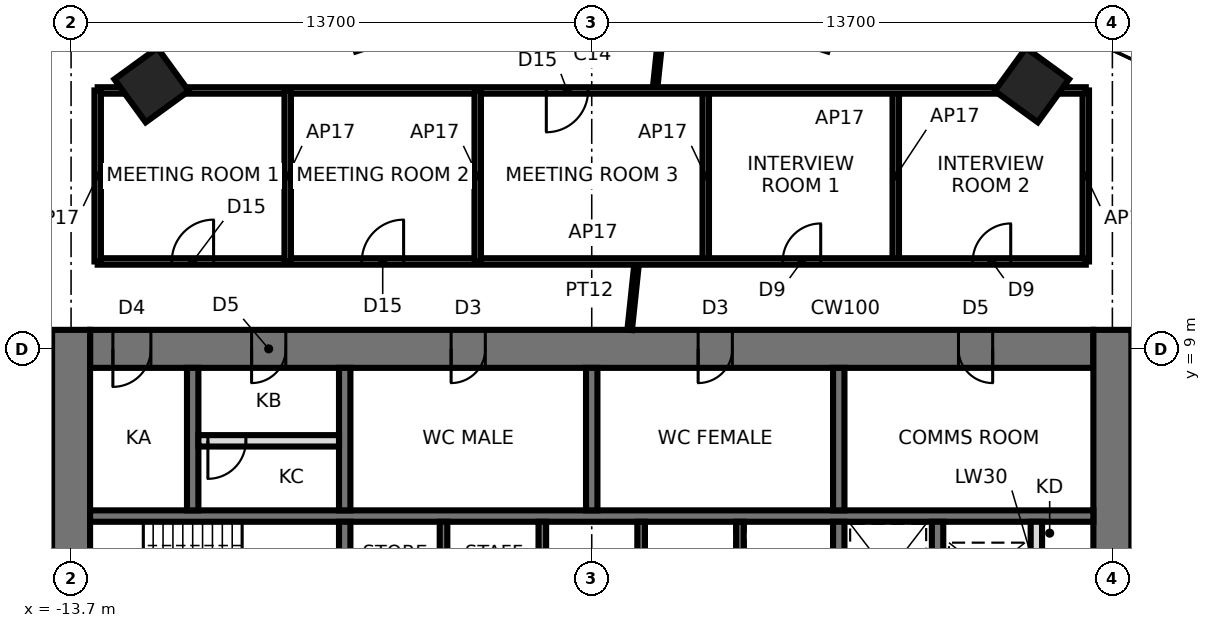
"""IFC4 building model, lengths in metres.
Left out: names, types, materials, properties, quantities, classifications, styles, units other than length and angle.
Written with IfcOpenShell. Run it as: python <this file> out.ifc"""

import sys

from ifc_helpers import new_model, si_unit, direction, frame, frame_2d, origin, origin_2d, place, context, subcontext, project, spatial, rectangle, extrude, element, fill, save


model = new_model("IFC4")
c1 = context("Model", 3, precision=1e-05, world=origin(), true_north=direction((0.0, 1.0)))
c2 = subcontext(c1, "Body", "Model", "MODEL_VIEW")
j1 = project(units=[si_unit("LENGTHUNIT", "METRE"), si_unit("PLANEANGLEUNIT", "RADIAN")], contexts=[c1])
p1 = place(None, origin())
s1 = spatial("IfcSite", under=j1, at=p1, CompositionType="ELEMENT")
p2 = place(p1, origin())
s2 = spatial("IfcBuilding", under=s1, at=p2, CompositionType="ELEMENT")
p3 = place(p2, frame((0.0, 0.0, 234.5)))
s3 = spatial("IfcBuildingStorey", under=s2, at=p3, CompositionType="ELEMENT", Elevation=234.5)
for number, where, z_axis, x_axis in (
    (1, (11.581, 15.94, 0.0), (0.0, 0.0, 1.0), (0.588, 0.809, 0.0)),
    (2, (-11.581, 15.94, 0.0), (0.0, 0.0, 1.0), (-0.588, 0.809, 0.0)),
):
    element("IfcColumn", number, at=place(p3, frame(where, z_axis=z_axis, x_axis=x_axis)), inside=s3, PredefinedType="COLUMN", context=c2, shape_type="SweptSolid", body=[
        extrude(rectangle(XDim=1.4, YDim=1.4, at=origin_2d()), origin(), (0.0, 0.0, 1.0), 3.9),
    ])
p4 = place(p3, frame((13.2, 9.0, 0.0), z_axis=(0.0, 0.0, 1.0), x_axis=(-1.0, 0.0, 0.0)))
e3 = element("IfcWall", 3, at=p4, inside=s3, PredefinedType="SHEAR", context=c2, shape_type="SweptSolid", body=[
    extrude(rectangle(XDim=26.4, YDim=1.0, at=frame_2d((13.2, 0.0))), origin(), (0.0, 0.0, 1.0), 3.9),
])
p5 = place(p4, frame((2.65, 0.0, 0.0)))
e4 = element("IfcOpeningElement", 4, at=p5, cuts=e3, PredefinedType="OPENING", context=c2, shape_type="SweptSolid", body=[
    extrude(rectangle(XDim=0.9, YDim=2.1, at=frame_2d((0.45, 1.05))), frame((0.0, 0.51, 0.0), z_axis=(0.0, -1.0, 0.0), x_axis=(1.0, 0.0, 0.0)), (0.0, 0.0, 1.0), 1.02),
])
p6 = place(p4, frame((9.5, 0.0, 0.0)))
e5 = element("IfcOpeningElement", 5, at=p6, cuts=e3, PredefinedType="OPENING", context=c2, shape_type="SweptSolid", body=[
    extrude(rectangle(XDim=0.9, YDim=2.1, at=frame_2d((0.45, 1.05))), frame((0.0, 0.51, 0.0), z_axis=(0.0, -1.0, 0.0), x_axis=(1.0, 0.0, 0.0)), (0.0, 0.0, 1.0), 1.02),
])
p7 = place(p4, frame((16.0, 0.0, 0.0)))
e6 = element("IfcOpeningElement", 6, at=p7, cuts=e3, PredefinedType="OPENING", context=c2, shape_type="SweptSolid", body=[
    extrude(rectangle(XDim=0.9, YDim=2.1, at=frame_2d((0.45, 1.05))), frame((0.0, 0.51, 0.0), z_axis=(0.0, -1.0, 0.0), x_axis=(1.0, 0.0, 0.0)), (0.0, 0.0, 1.0), 1.02),
])
p8 = place(p4, frame((21.25, 0.0, 0.0)))
e7 = element("IfcOpeningElement", 7, at=p8, cuts=e3, PredefinedType="OPENING", context=c2, shape_type="SweptSolid", body=[
    extrude(rectangle(XDim=0.9, YDim=2.1, at=frame_2d((0.45, 1.05))), frame((0.0, 0.51, 0.0), z_axis=(0.0, -1.0, 0.0), x_axis=(1.0, 0.0, 0.0)), (0.0, 0.0, 1.0), 1.02),
])
p9 = place(p4, frame((24.8, 0.0, 0.0)))
e8 = element("IfcOpeningElement", 8, at=p9, cuts=e3, PredefinedType="OPENING", context=c2, shape_type="SweptSolid", body=[
    extrude(rectangle(XDim=1.0, YDim=2.1, at=frame_2d((0.5, 1.05))), frame((0.0, 0.51, 0.0), z_axis=(0.0, -1.0, 0.0), x_axis=(1.0, 0.0, 0.0)), (0.0, 0.0, 1.0), 1.02),
])
p10 = place(p3, frame((13.7, -9.5, 0.0), z_axis=(0.0, 0.0, 1.0), x_axis=(0.0, 1.0, 0.0)))
e9 = element("IfcWall", 9, at=p10, inside=s3, PredefinedType="SHEAR", context=c2, shape_type="SweptSolid", body=[
    extrude(rectangle(XDim=19.0, YDim=1.0, at=frame_2d((9.5, 0.0))), origin(), (0.0, 0.0, 1.0), 3.9),
])
p11 = place(p10, frame((8.6, 0.0, 0.0)))
e10 = element("IfcOpeningElement", 10, at=p11, cuts=e9, PredefinedType="OPENING", context=c2, shape_type="SweptSolid", body=[
    extrude(rectangle(XDim=1.8, YDim=2.4, at=frame_2d((0.9, 1.2))), frame((0.0, 0.51, 0.0), z_axis=(0.0, -1.0, 0.0), x_axis=(1.0, 0.0, 0.0)), (0.0, 0.0, 1.0), 1.02),
])
p12 = place(p3, frame((-13.7, 9.5, 0.0), z_axis=(0.0, 0.0, 1.0), x_axis=(0.0, -1.0, 0.0)))
e11 = element("IfcWall", 11, at=p12, inside=s3, PredefinedType="SHEAR", context=c2, shape_type="SweptSolid", body=[
    extrude(rectangle(XDim=19.0, YDim=1.0, at=frame_2d((9.5, 0.0))), origin(), (0.0, 0.0, 1.0), 3.9),
])
p13 = place(p12, frame((8.6, 0.0, 0.0)))
e12 = element("IfcOpeningElement", 12, at=p13, cuts=e11, PredefinedType="OPENING", context=c2, shape_type="SweptSolid", body=[
    extrude(rectangle(XDim=1.8, YDim=2.4, at=frame_2d((0.9, 1.2))), frame((0.0, 0.51, 0.0), z_axis=(0.0, -1.0, 0.0), x_axis=(1.0, 0.0, 0.0)), (0.0, 0.0, 1.0), 1.02),
])
p14 = place(p3, frame((-13.2, 4.6, 0.0), z_axis=(0.0, 0.0, 1.0), x_axis=(1.0, 0.0, 0.0)))
e13 = element("IfcWall", 13, at=p14, inside=s3, PredefinedType="SHEAR", context=c2, shape_type="SweptSolid", body=[
    extrude(rectangle(XDim=26.4, YDim=0.3, at=frame_2d((13.2, 0.0))), origin(), (0.0, 0.0, 1.0), 3.9),
])
p15 = place(p3, frame((-6.5, 1.75, 0.0), z_axis=(0.0, 0.0, 1.0), x_axis=(0.0, 1.0, 0.0)))
e14 = element("IfcWall", 14, at=p15, inside=s3, PredefinedType="SHEAR", context=c2, shape_type="SweptSolid", body=[
    extrude(rectangle(XDim=2.7, YDim=0.3, at=frame_2d((1.35, 0.0))), origin(), (0.0, 0.0, 1.0), 3.9),
])
p16 = place(p3, frame((-6.5, 4.75, 0.0), z_axis=(0.0, 0.0, 1.0), x_axis=(0.0, 1.0, 0.0)))
e15 = element("IfcWall", 15, at=p16, inside=s3, PredefinedType="SHEAR", context=c2, shape_type="SweptSolid", body=[
    extrude(rectangle(XDim=3.75, YDim=0.3, at=frame_2d((1.875, 0.0))), origin(), (0.0, 0.0, 1.0), 3.9),
])
p17 = place(p3, frame((6.5, 1.75, 0.0), z_axis=(0.0, 0.0, 1.0), x_axis=(0.0, 1.0, 0.0)))
e16 = element("IfcWall", 16, at=p17, inside=s3, PredefinedType="SHEAR", context=c2, shape_type="SweptSolid", body=[
    extrude(rectangle(XDim=2.7, YDim=0.3, at=frame_2d((1.35, 0.0))), origin(), (0.0, 0.0, 1.0), 3.9),
])
p18 = place(p3, frame((6.5, 4.75, 0.0), z_axis=(0.0, 0.0, 1.0), x_axis=(0.0, 1.0, 0.0)))
e17 = element("IfcWall", 17, at=p18, inside=s3, PredefinedType="SHEAR", context=c2, shape_type="SweptSolid", body=[
    extrude(rectangle(XDim=3.75, YDim=0.3, at=frame_2d((1.875, 0.0))), origin(), (0.0, 0.0, 1.0), 3.9),
])
for number, where, z_axis, x_axis in (
    (18, (-3.9, 1.75, 0.0), (0.0, 0.0, 1.0), (0.0, 1.0, 0.0)),
    (19, (-1.3, 1.75, 0.0), (0.0, 0.0, 1.0), (0.0, 1.0, 0.0)),
    (20, (1.3, 1.75, 0.0), (0.0, 0.0, 1.0), (0.0, 1.0, 0.0)),
    (21, (3.9, 1.75, 0.0), (0.0, 0.0, 1.0), (0.0, 1.0, 0.0)),
):
    element("IfcWall", number, at=place(p3, frame(where, z_axis=z_axis, x_axis=x_axis)), inside=s3, PredefinedType="SHEAR", context=c2, shape_type="SweptSolid", body=[
        extrude(rectangle(XDim=2.7, YDim=0.2, at=frame_2d((1.35, 0.0))), origin(), (0.0, 0.0, 1.0), 3.9),
    ])
for number, where, z_axis, x_axis in (
    (22, (0.0, 4.75, 0.0), (0.0, 0.0, 1.0), (0.0, 1.0, 0.0)),
    (23, (-10.5, 4.75, 0.0), (0.0, 0.0, 1.0), (0.0, 1.0, 0.0)),
):
    element("IfcWall", number, at=place(p3, frame(where, z_axis=z_axis, x_axis=x_axis)), inside=s3, PredefinedType="SHEAR", context=c2, shape_type="SweptSolid", body=[
        extrude(rectangle(XDim=3.75, YDim=0.3, at=frame_2d((1.875, 0.0))), origin(), (0.0, 0.0, 1.0), 3.9),
    ])
p19 = place(p3, frame((9.1, 1.75, 0.0), z_axis=(0.0, 0.0, 1.0), x_axis=(0.0, 1.0, 0.0)))
e24 = element("IfcWall", 24, at=p19, inside=s3, PredefinedType="SHEAR", context=c2, shape_type="SweptSolid", body=[
    extrude(rectangle(XDim=2.7, YDim=0.3, at=frame_2d((1.35, 0.0))), origin(), (0.0, 0.0, 1.0), 3.9),
])
p20 = place(p3, frame((-10.35, 6.58, 0.0), z_axis=(0.0, 0.0, 1.0), x_axis=(1.0, 0.0, 0.0)))
e25 = element("IfcWall", 25, at=p20, inside=s3, PredefinedType="PARTITIONING", context=c2, shape_type="SweptSolid", body=[
    extrude(rectangle(XDim=3.7, YDim=0.3, at=frame_2d((1.85, 0.0))), origin(), (0.0, 0.0, 1.0), 3.74),
])
p21 = place(p20, frame((0.25, 0.0, 0.0)))
e26 = element("IfcOpeningElement", 26, at=p21, cuts=e25, PredefinedType="OPENING", context=c2, shape_type="SweptSolid", body=[
    extrude(rectangle(XDim=1.0, YDim=2.4, at=frame_2d((0.5, 1.2))), frame((0.0, 0.16, 0.0), z_axis=(0.0, -1.0, 0.0), x_axis=(1.0, 0.0, 0.0)), (0.0, 0.0, 1.0), 0.32),
])
p22 = place(p3, frame((11.7, 1.75, 0.0), z_axis=(0.0, 0.0, 1.0), x_axis=(0.0, 1.0, 0.0)))
e27 = element("IfcWall", 27, at=p22, inside=s3, PredefinedType="SOLIDWALL", context=c2, shape_type="SweptSolid", body=[
    extrude(rectangle(XDim=2.7, YDim=0.3, at=frame_2d((1.35, 0.0))), origin(), (0.0, 0.0, 1.0), 3.74),
])
for number, where, z_axis, x_axis in (
    (28, (13.0, 11.3, 0.0), (0.0, 0.0, 1.0), (0.0, 1.0, 0.0)),
    (29, (8.0, 15.8, 0.0), (0.0, 0.0, 1.0), (0.0, -1.0, 0.0)),
    (30, (3.0, 15.8, 0.0), (0.0, 0.0, 1.0), (0.0, -1.0, 0.0)),
):
    element("IfcWall", number, at=place(p3, frame(where, z_axis=z_axis, x_axis=x_axis)), inside=s3, PredefinedType="PARTITIONING", context=c2, shape_type="SweptSolid", body=[
        extrude(rectangle(XDim=4.5, YDim=0.17, at=frame_2d((2.25, 0.0))), origin(), (0.0, 0.0, 1.0), 3.74),
    ])
p23 = place(p3, frame((1.661, 15.8, 0.0), z_axis=(0.0, 0.0, 1.0), x_axis=(0.104548874513, 0.994519749848, 0.0)))
e31 = element("IfcWall", 31, at=p23, inside=s3, PredefinedType="PARTITIONING", context=c2, shape_type="SweptSolid", body=[
    extrude(rectangle(XDim=4.302, YDim=0.12, at=frame_2d((2.151, 0.0))), origin(), (0.0, 0.0, 1.0), 3.74),
])
p24 = place(p3, frame((0.999, 9.5, 0.0), z_axis=(0.0, 0.0, 1.0), x_axis=(0.104537331683, 0.99452096322, 0.0)))
e32 = element("IfcWall", 32, at=p24, inside=s3, PredefinedType="PARTITIONING", context=c2, shape_type="SweptSolid", body=[
    extrude(rectangle(XDim=1.81, YDim=0.12, at=frame_2d((0.905, 0.0))), origin(), (0.0, 0.0, 1.0), 3.74),
])
p25 = place(p3, frame((-13.0, 11.3, 0.0), z_axis=(0.0, 0.0, 1.0), x_axis=(1.0, 0.0, 0.0)))
e33 = element("IfcWall", 33, at=p25, inside=s3, PredefinedType="PARTITIONING", context=c2, shape_type="SweptSolid", body=[
    extrude(rectangle(XDim=26.0, YDim=0.17, at=frame_2d((13.0, 0.0))), origin(), (0.0, 0.0, 1.0), 3.74),
])
p26 = place(p25, frame((1.95, 0.0, 0.0)))
e34 = element("IfcOpeningElement", 34, at=p26, cuts=e33, PredefinedType="OPENING", context=c2, shape_type="SweptSolid", body=[
    extrude(rectangle(XDim=1.1, YDim=2.4, at=frame_2d((0.55, 1.2))), frame((0.0, 0.095, 0.0), z_axis=(0.0, -1.0, 0.0), x_axis=(1.0, 0.0, 0.0)), (0.0, 0.0, 1.0), 0.19),
])
p27 = place(p25, frame((6.95, 0.0, 0.0)))
e35 = element("IfcOpeningElement", 35, at=p27, cuts=e33, PredefinedType="OPENING", context=c2, shape_type="SweptSolid", body=[
    extrude(rectangle(XDim=1.1, YDim=2.4, at=frame_2d((0.55, 1.2))), frame((0.0, 0.095, 0.0), z_axis=(0.0, -1.0, 0.0), x_axis=(1.0, 0.0, 0.0)), (0.0, 0.0, 1.0), 0.19),
])
p28 = place(p25, frame((18.025, 0.0, 0.0)))
e36 = element("IfcOpeningElement", 36, at=p28, cuts=e33, PredefinedType="OPENING", context=c2, shape_type="SweptSolid", body=[
    extrude(rectangle(XDim=1.0, YDim=2.4, at=frame_2d((0.5, 1.2))), frame((0.0, 0.095, 0.0), z_axis=(0.0, -1.0, 0.0), x_axis=(1.0, 0.0, 0.0)), (0.0, 0.0, 1.0), 0.19),
])
p29 = place(p25, frame((23.025, 0.0, 0.0)))
e37 = element("IfcOpeningElement", 37, at=p29, cuts=e33, PredefinedType="OPENING", context=c2, shape_type="SweptSolid", body=[
    extrude(rectangle(XDim=1.0, YDim=2.4, at=frame_2d((0.5, 1.2))), frame((0.0, 0.095, 0.0), z_axis=(0.0, -1.0, 0.0), x_axis=(1.0, 0.0, 0.0)), (0.0, 0.0, 1.0), 0.19),
])
p30 = place(p3, frame((13.0, 15.8, 0.0), z_axis=(0.0, 0.0, 1.0), x_axis=(-1.0, 0.0, 0.0)))
e38 = element("IfcWall", 38, at=p30, inside=s3, PredefinedType="PARTITIONING", context=c2, shape_type="SweptSolid", body=[
    extrude(rectangle(XDim=26.0, YDim=0.17, at=frame_2d((13.0, 0.0))), origin(), (0.0, 0.0, 1.0), 3.74),
])
p31 = place(p30, frame((13.095, 0.0, 0.0)))
e39 = element("IfcOpeningElement", 39, at=p31, cuts=e38, PredefinedType="OPENING", context=c2, shape_type="SweptSolid", body=[
    extrude(rectangle(XDim=1.1, YDim=2.4, at=frame_2d((0.55, 1.2))), frame((0.0, 0.095, 0.0), z_axis=(0.0, -1.0, 0.0), x_axis=(1.0, 0.0, 0.0)), (0.0, 0.0, 1.0), 0.19),
])
for number, where, z_axis, x_axis in (
    (40, (-3.0, 15.8, 0.0), (0.0, 0.0, 1.0), (0.0, -1.0, 0.0)),
    (41, (-8.0, 15.8, 0.0), (0.0, 0.0, 1.0), (0.0, -1.0, 0.0)),
    (42, (-13.0, 15.8, 0.0), (0.0, 0.0, 1.0), (0.0, -1.0, 0.0)),
):
    element("IfcWall", number, at=place(p3, frame(where, z_axis=z_axis, x_axis=x_axis)), inside=s3, PredefinedType="PARTITIONING", context=c2, shape_type="SweptSolid", body=[
        extrude(rectangle(XDim=4.5, YDim=0.17, at=frame_2d((2.25, 0.0))), origin(), (0.0, 0.0, 1.0), 3.74),
    ])
p32 = place(p5, origin())
e43 = element("IfcDoor", 43, at=p32, inside=s3, OperationType="SINGLE_SWING_LEFT", PredefinedType="DOOR", context=c2, shape_type="SweptSolid", body=[
    extrude(rectangle(XDim=0.82, YDim=2.06, at=frame_2d((0.45, 1.03))), frame((0.0, 0.025, 0.0), z_axis=(0.0, -1.0, 0.0), x_axis=(1.0, 0.0, 0.0)), (0.0, 0.0, 1.0), 0.05),
    extrude(rectangle(XDim=0.04, YDim=2.1, at=frame_2d((0.02, 1.05))), frame((0.0, 0.25, 0.0), z_axis=(0.0, -1.0, 0.0), x_axis=(1.0, 0.0, 0.0)), (0.0, 0.0, 1.0), 0.5),
    extrude(rectangle(XDim=0.04, YDim=2.1, at=frame_2d((0.88, 1.05))), frame((0.0, 0.25, 0.0), z_axis=(0.0, -1.0, 0.0), x_axis=(1.0, 0.0, 0.0)), (0.0, 0.0, 1.0), 0.5),
    extrude(rectangle(XDim=0.82, YDim=0.04, at=frame_2d((0.45, 2.08))), frame((0.0, 0.25, 0.0), z_axis=(0.0, -1.0, 0.0), x_axis=(1.0, 0.0, 0.0)), (0.0, 0.0, 1.0), 0.5),
])
fill(e4, e43)
p33 = place(p6, origin())
e44 = element("IfcDoor", 44, at=p33, inside=s3, OperationType="SINGLE_SWING_RIGHT", PredefinedType="DOOR", context=c2, shape_type="SweptSolid", body=[
    extrude(rectangle(XDim=0.82, YDim=2.06, at=frame_2d((0.45, 1.03))), frame((0.0, 0.025, 0.0), z_axis=(0.0, -1.0, 0.0), x_axis=(1.0, 0.0, 0.0)), (0.0, 0.0, 1.0), 0.05),
    extrude(rectangle(XDim=0.04, YDim=2.1, at=frame_2d((0.02, 1.05))), frame((0.0, 0.25, 0.0), z_axis=(0.0, -1.0, 0.0), x_axis=(1.0, 0.0, 0.0)), (0.0, 0.0, 1.0), 0.5),
    extrude(rectangle(XDim=0.04, YDim=2.1, at=frame_2d((0.88, 1.05))), frame((0.0, 0.25, 0.0), z_axis=(0.0, -1.0, 0.0), x_axis=(1.0, 0.0, 0.0)), (0.0, 0.0, 1.0), 0.5),
    extrude(rectangle(XDim=0.82, YDim=0.04, at=frame_2d((0.45, 2.08))), frame((0.0, 0.25, 0.0), z_axis=(0.0, -1.0, 0.0), x_axis=(1.0, 0.0, 0.0)), (0.0, 0.0, 1.0), 0.5),
])
fill(e5, e44)
p34 = place(p7, origin())
e45 = element("IfcDoor", 45, at=p34, inside=s3, OperationType="SINGLE_SWING_RIGHT", PredefinedType="DOOR", context=c2, shape_type="SweptSolid", body=[
    extrude(rectangle(XDim=0.82, YDim=2.06, at=frame_2d((0.45, 1.03))), frame((0.0, 0.025, 0.0), z_axis=(0.0, -1.0, 0.0), x_axis=(1.0, 0.0, 0.0)), (0.0, 0.0, 1.0), 0.05),
    extrude(rectangle(XDim=0.04, YDim=2.1, at=frame_2d((0.02, 1.05))), frame((0.0, 0.25, 0.0), z_axis=(0.0, -1.0, 0.0), x_axis=(1.0, 0.0, 0.0)), (0.0, 0.0, 1.0), 0.5),
    extrude(rectangle(XDim=0.04, YDim=2.1, at=frame_2d((0.88, 1.05))), frame((0.0, 0.25, 0.0), z_axis=(0.0, -1.0, 0.0), x_axis=(1.0, 0.0, 0.0)), (0.0, 0.0, 1.0), 0.5),
    extrude(rectangle(XDim=0.82, YDim=0.04, at=frame_2d((0.45, 2.08))), frame((0.0, 0.25, 0.0), z_axis=(0.0, -1.0, 0.0), x_axis=(1.0, 0.0, 0.0)), (0.0, 0.0, 1.0), 0.5),
])
fill(e6, e45)
p35 = place(p8, origin())
e46 = element("IfcDoor", 46, at=p35, inside=s3, OperationType="SINGLE_SWING_RIGHT", PredefinedType="DOOR", context=c2, shape_type="SweptSolid", body=[
    extrude(rectangle(XDim=0.82, YDim=2.06, at=frame_2d((0.45, 1.03))), frame((0.0, 0.025, 0.0), z_axis=(0.0, -1.0, 0.0), x_axis=(1.0, 0.0, 0.0)), (0.0, 0.0, 1.0), 0.05),
    extrude(rectangle(XDim=0.04, YDim=2.1, at=frame_2d((0.02, 1.05))), frame((0.0, 0.25, 0.0), z_axis=(0.0, -1.0, 0.0), x_axis=(1.0, 0.0, 0.0)), (0.0, 0.0, 1.0), 0.5),
    extrude(rectangle(XDim=0.04, YDim=2.1, at=frame_2d((0.88, 1.05))), frame((0.0, 0.25, 0.0), z_axis=(0.0, -1.0, 0.0), x_axis=(1.0, 0.0, 0.0)), (0.0, 0.0, 1.0), 0.5),
    extrude(rectangle(XDim=0.82, YDim=0.04, at=frame_2d((0.45, 2.08))), frame((0.0, 0.25, 0.0), z_axis=(0.0, -1.0, 0.0), x_axis=(1.0, 0.0, 0.0)), (0.0, 0.0, 1.0), 0.5),
])
fill(e7, e46)
p36 = place(p9, origin())
e47 = element("IfcDoor", 47, at=p36, inside=s3, OperationType="SINGLE_SWING_RIGHT", PredefinedType="DOOR", context=c2, shape_type="SweptSolid", body=[
    extrude(rectangle(XDim=0.92, YDim=2.06, at=frame_2d((0.5, 1.03))), frame((0.0, 0.025, 0.0), z_axis=(0.0, -1.0, 0.0), x_axis=(1.0, 0.0, 0.0)), (0.0, 0.0, 1.0), 0.05),
    extrude(rectangle(XDim=0.04, YDim=2.1, at=frame_2d((0.02, 1.05))), frame((0.0, 0.25, 0.0), z_axis=(0.0, -1.0, 0.0), x_axis=(1.0, 0.0, 0.0)), (0.0, 0.0, 1.0), 0.5),
    extrude(rectangle(XDim=0.04, YDim=2.1, at=frame_2d((0.98, 1.05))), frame((0.0, 0.25, 0.0), z_axis=(0.0, -1.0, 0.0), x_axis=(1.0, 0.0, 0.0)), (0.0, 0.0, 1.0), 0.5),
    extrude(rectangle(XDim=0.92, YDim=0.04, at=frame_2d((0.5, 2.08))), frame((0.0, 0.25, 0.0), z_axis=(0.0, -1.0, 0.0), x_axis=(1.0, 0.0, 0.0)), (0.0, 0.0, 1.0), 0.5),
])
fill(e8, e47)
p37 = place(p21, frame((1.0, 0.0, 0.0), z_axis=(0.0, 0.0, 1.0), x_axis=(-1.0, 0.0, 0.0)))
e48 = element("IfcDoor", 48, at=p37, inside=s3, OperationType="SINGLE_SWING_RIGHT", PredefinedType="DOOR", context=c2, shape_type="SweptSolid", body=[
    extrude(rectangle(XDim=1.0, YDim=2.4, at=frame_2d((0.5, 1.2))), frame((0.0, 0.025, 0.0), z_axis=(0.0, -1.0, 0.0), x_axis=(1.0, 0.0, 0.0)), (0.0, 0.0, 1.0), 0.05),
])
fill(e26, e48)
p38 = place(p26, origin())
e49 = element("IfcDoor", 49, at=p38, inside=s3, OperationType="SINGLE_SWING_RIGHT", PredefinedType="DOOR", context=c2, shape_type="SweptSolid", body=[
    extrude(rectangle(XDim=1.1, YDim=2.4, at=frame_2d((0.55, 1.2))), frame((0.0, 0.025, 0.0), z_axis=(0.0, -1.0, 0.0), x_axis=(1.0, 0.0, 0.0)), (0.0, 0.0, 1.0), 0.05),
])
fill(e34, e49)
p39 = place(p27, origin())
e50 = element("IfcDoor", 50, at=p39, inside=s3, OperationType="SINGLE_SWING_RIGHT", PredefinedType="DOOR", context=c2, shape_type="SweptSolid", body=[
    extrude(rectangle(XDim=1.1, YDim=2.4, at=frame_2d((0.55, 1.2))), frame((0.0, 0.025, 0.0), z_axis=(0.0, -1.0, 0.0), x_axis=(1.0, 0.0, 0.0)), (0.0, 0.0, 1.0), 0.05),
])
fill(e35, e50)
p40 = place(p31, origin())
e51 = element("IfcDoor", 51, at=p40, inside=s3, OperationType="SINGLE_SWING_RIGHT", PredefinedType="DOOR", context=c2, shape_type="SweptSolid", body=[
    extrude(rectangle(XDim=1.1, YDim=2.4, at=frame_2d((0.55, 1.2))), frame((0.0, 0.025, 0.0), z_axis=(0.0, -1.0, 0.0), x_axis=(1.0, 0.0, 0.0)), (0.0, 0.0, 1.0), 0.05),
])
fill(e39, e51)
p41 = place(p28, origin())
e52 = element("IfcDoor", 52, at=p41, inside=s3, OperationType="SINGLE_SWING_RIGHT", PredefinedType="DOOR", context=c2, shape_type="SweptSolid", body=[
    extrude(rectangle(XDim=1.0, YDim=2.4, at=frame_2d((0.5, 1.2))), frame((0.0, 0.025, 0.0), z_axis=(0.0, -1.0, 0.0), x_axis=(1.0, 0.0, 0.0)), (0.0, 0.0, 1.0), 0.05),
])
fill(e36, e52)
p42 = place(p29, origin())
e53 = element("IfcDoor", 53, at=p42, inside=s3, OperationType="SINGLE_SWING_RIGHT", PredefinedType="DOOR", context=c2, shape_type="SweptSolid", body=[
    extrude(rectangle(XDim=1.0, YDim=2.4, at=frame_2d((0.5, 1.2))), frame((0.0, 0.025, 0.0), z_axis=(0.0, -1.0, 0.0), x_axis=(1.0, 0.0, 0.0)), (0.0, 0.0, 1.0), 0.05),
])
fill(e37, e53)
save(model, sys.argv[1])
